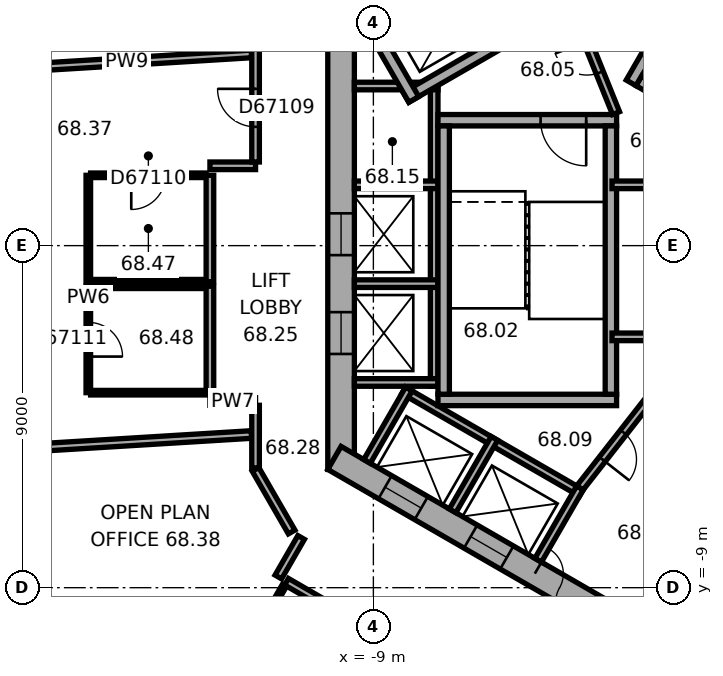
"""IFC4 building model, lengths in metres.
Left out: names, types, materials, properties, quantities, classifications, styles, units other than length and angle.
Written with IfcOpenShell. Run it as: python <this file> out.ifc"""

import sys

from ifc_helpers import new_model, si_unit, direction, frame, frame_2d, origin, place, context, subcontext, project, spatial, rectangle, extrude, element, fill, save


model = new_model("IFC4")
c1 = context("Model", 3, precision=1e-05, world=origin(), true_north=direction((0.0, 1.0)))
c2 = subcontext(c1, "Body", "Model", "MODEL_VIEW")
j1 = project(units=[si_unit("LENGTHUNIT", "METRE"), si_unit("PLANEANGLEUNIT", "RADIAN")], contexts=[c1])
p1 = place(None, origin())
s1 = spatial("IfcSite", under=j1, at=p1, CompositionType="ELEMENT")
p2 = place(p1, origin())
s2 = spatial("IfcBuilding", under=s1, at=p2, CompositionType="ELEMENT")
p3 = place(p2, frame((0.0, 0.0, 274.6)))
s3 = spatial("IfcBuildingStorey", under=s2, at=p3, CompositionType="ELEMENT", Elevation=274.6)
p4 = place(p3, frame((-9.85, 5.889, 0.0), z_axis=(0.0, 0.0, 1.0), x_axis=(0.0, -1.0, 0.0)))
e1 = element("IfcWall", 1, at=p4, inside=s3, PredefinedType="SHEAR", context=c2, shape_type="SweptSolid", body=[
    extrude(rectangle(XDim=11.778, YDim=0.7, at=frame_2d((5.889, 0.0))), origin(), (0.0, 0.0, 1.0), 3.7),
])
p5 = place(p4, frame((5.039, 0.0, 0.0)))
e2 = element("IfcOpeningElement", 2, at=p5, cuts=e1, PredefinedType="OPENING", context=c2, shape_type="SweptSolid", body=[
    extrude(rectangle(XDim=1.1, YDim=2.1, at=frame_2d((0.55, 1.05))), frame((0.0, 0.36, 0.0), z_axis=(0.0, -1.0, 0.0), x_axis=(1.0, 0.0, 0.0)), (0.0, 0.0, 1.0), 0.72),
])
p6 = place(p4, frame((7.639, 0.0, 0.0)))
e3 = element("IfcOpeningElement", 3, at=p6, cuts=e1, PredefinedType="OPENING", context=c2, shape_type="SweptSolid", body=[
    extrude(rectangle(XDim=1.1, YDim=2.1, at=frame_2d((0.55, 1.05))), frame((0.0, 0.36, 0.0), z_axis=(0.0, -1.0, 0.0), x_axis=(1.0, 0.0, 0.0)), (0.0, 0.0, 1.0), 0.72),
])
p7 = place(p3, frame((-10.025, -5.586, 0.0), z_axis=(0.0, 0.0, 1.0), x_axis=(0.866026453023, -0.499998182661, 0.0)))
e4 = element("IfcWall", 4, at=p7, inside=s3, PredefinedType="SHEAR", context=c2, shape_type="SweptSolid", body=[
    extrude(rectangle(XDim=11.778, YDim=0.7, at=frame_2d((5.889, 0.0))), origin(), (0.0, 0.0, 1.0), 3.7),
])
p8 = place(p7, frame((6.089, 0.0, 0.0)))
e5 = element("IfcOpeningElement", 5, at=p8, cuts=e4, PredefinedType="OPENING", context=c2, shape_type="SweptSolid", body=[
    extrude(rectangle(XDim=1.5, YDim=2.1, at=frame_2d((0.75, 1.05))), frame((0.0, 0.36, 0.0), z_axis=(0.0, -1.0, 0.0), x_axis=(1.0, 0.0, 0.0)), (0.0, 0.0, 1.0), 0.72),
])
p9 = place(p7, frame((1.539, 0.0, 0.0)))
e6 = element("IfcOpeningElement", 6, at=p9, cuts=e4, PredefinedType="OPENING", context=c2, shape_type="SweptSolid", body=[
    extrude(rectangle(XDim=1.1, YDim=2.1, at=frame_2d((0.55, 1.05))), frame((0.0, 0.36, 0.0), z_axis=(0.0, -1.0, 0.0), x_axis=(1.0, 0.0, 0.0)), (0.0, 0.0, 1.0), 0.72),
])
p10 = place(p7, frame((4.139, 0.0, 0.0)))
e7 = element("IfcOpeningElement", 7, at=p10, cuts=e4, PredefinedType="OPENING", context=c2, shape_type="SweptSolid", body=[
    extrude(rectangle(XDim=1.1, YDim=2.1, at=frame_2d((0.55, 1.05))), frame((0.0, 0.36, 0.0), z_axis=(0.0, -1.0, 0.0), x_axis=(1.0, 0.0, 0.0)), (0.0, 0.0, 1.0), 0.72),
])
p11 = place(p3, frame((-7.4, 4.3, 0.0), z_axis=(0.0, 0.0, 1.0), x_axis=(0.0, -1.0, 0.0)))
e8 = element("IfcWall", 8, at=p11, inside=s3, PredefinedType="PARTITIONING", context=c2, shape_type="SweptSolid", body=[
    extrude(rectangle(XDim=8.0, YDim=0.2, at=frame_2d((4.0, 0.0))), origin(), (0.0, 0.0, 1.0), 3.35),
])
for number, where, z_axis, x_axis in (
    (9, (-7.3, 4.2, 0.0), (0.0, 0.0, 1.0), (-1.0, 0.0, 0.0)),
    (10, (-7.3, 1.6, 0.0), (0.0, 0.0, 1.0), (-1.0, 0.0, 0.0)),
    (11, (-7.3, -1.0, 0.0), (0.0, 0.0, 1.0), (-1.0, 0.0, 0.0)),
    (12, (-7.3, -3.6, 0.0), (0.0, 0.0, 1.0), (-1.0, 0.0, 0.0)),
):
    element("IfcWall", number, at=place(p3, frame(where, z_axis=z_axis, x_axis=x_axis)), inside=s3, PredefinedType="PARTITIONING", context=c2, shape_type="SweptSolid", body=[
        extrude(rectangle(XDim=2.2, YDim=0.2, at=frame_2d((1.1, 0.0))), origin(), (0.0, 0.0, 1.0), 3.35),
    ])
p12 = place(p3, frame((-8.203, -3.809, 0.0), z_axis=(0.0, 0.0, 1.0), x_axis=(0.866028230842, -0.499995103361, 0.0)))
e13 = element("IfcWall", 13, at=p12, inside=s3, PredefinedType="PARTITIONING", context=c2, shape_type="SweptSolid", body=[
    extrude(rectangle(XDim=5.4, YDim=0.2, at=frame_2d((2.7, 0.0))), origin(), (0.0, 0.0, 1.0), 3.35),
])
for number, where, z_axis, x_axis in (
    (14, (-8.067, -3.772, 0.0), (0.0, 0.0, 1.0), (-0.5, -0.866, 0.0)),
    (15, (-5.815, -5.072, 0.0), (0.0, 0.0, 1.0), (-0.5, -0.866, 0.0)),
):
    element("IfcWall", number, at=place(p3, frame(where, z_axis=z_axis, x_axis=x_axis)), inside=s3, PredefinedType="PARTITIONING", context=c2, shape_type="SweptSolid", body=[
        extrude(rectangle(XDim=2.2, YDim=0.2, at=frame_2d((1.1, 0.0))), origin(), (0.0, 0.0, 1.0), 3.35),
    ])
p13 = place(p3, frame((-3.563, -6.372, 0.0), z_axis=(0.0, 0.0, 1.0), x_axis=(-0.499994660107, -0.866028486751, 0.0)))
e16 = element("IfcWall", 16, at=p13, inside=s3, PredefinedType="PARTITIONING", context=c2, shape_type="SweptSolid", body=[
    extrude(rectangle(XDim=2.2, YDim=0.2, at=frame_2d((1.1, 0.0))), origin(), (0.0, 0.0, 1.0), 3.35),
])
p14 = place(p3, frame((-2.216, 4.282, 0.0), z_axis=(0.0, 0.0, 1.0), x_axis=(0.499977259774, 0.866038532462, 0.0)))
e17 = element("IfcWall", 17, at=p14, inside=s3, PredefinedType="SHEAR", context=c2, shape_type="SweptSolid", body=[
    extrude(rectangle(XDim=4.7, YDim=0.3, at=frame_2d((2.35, 0.0))), origin(), (0.0, 0.0, 1.0), 3.35),
])
p15 = place(p3, frame((4.103, 0.807, 0.0), z_axis=(0.0, 0.0, 1.0), x_axis=(-0.866027801685, 0.499995846692, 0.0)))
e18 = element("IfcWall", 18, at=p15, inside=s3, PredefinedType="SHEAR", context=c2, shape_type="SweptSolid", body=[
    extrude(rectangle(XDim=7.06, YDim=0.3, at=frame_2d((3.53, 0.0))), origin(), (0.0, 0.0, 1.0), 3.35),
])
p16 = place(p3, frame((-2.6, 3.3, 0.0), z_axis=(0.0, 0.0, 1.0), x_axis=(-1.0, 0.0, 0.0)))
e19 = element("IfcWall", 19, at=p16, inside=s3, PredefinedType="SHEAR", context=c2, shape_type="SweptSolid", body=[
    extrude(rectangle(XDim=4.7, YDim=0.3, at=frame_2d((2.35, 0.0))), origin(), (0.0, 0.0, 1.0), 3.35),
])
p17 = place(p16, frame((0.8, 0.0, 0.0)))
e20 = element("IfcOpeningElement", 20, at=p17, cuts=e19, PredefinedType="OPENING", context=c2, shape_type="SweptSolid", body=[
    extrude(rectangle(XDim=1.2, YDim=2.1, at=frame_2d((0.6, 1.05))), frame((0.0, 0.16, 0.0), z_axis=(0.0, -1.0, 0.0), x_axis=(1.0, 0.0, 0.0)), (0.0, 0.0, 1.0), 0.32),
])
p18 = place(p3, frame((-2.6, -4.06, 0.0), z_axis=(0.0, 0.0, 1.0), x_axis=(-1.0, 0.0, 0.0)))
e21 = element("IfcWall", 21, at=p18, inside=s3, PredefinedType="SHEAR", context=c2, shape_type="SweptSolid", body=[
    extrude(rectangle(XDim=4.7, YDim=0.3, at=frame_2d((2.35, 0.0))), origin(), (0.0, 0.0, 1.0), 3.35),
])
for number, where, z_axis, x_axis in (
    (22, (-2.75, 3.15, 0.0), (0.0, 0.0, 1.0), (0.0, -1.0, 0.0)),
    (23, (-7.15, 3.15, 0.0), (0.0, 0.0, 1.0), (0.0, -1.0, 0.0)),
):
    element("IfcWall", number, at=place(p3, frame(where, z_axis=z_axis, x_axis=x_axis)), inside=s3, PredefinedType="SHEAR", context=c2, shape_type="SweptSolid", body=[
        extrude(rectangle(XDim=7.06, YDim=0.3, at=frame_2d((3.53, 0.0))), origin(), (0.0, 0.0, 1.0), 3.35),
    ])
p19 = place(p3, frame((-5.24, 5.577, 0.0), z_axis=(0.0, 0.0, 1.0), x_axis=(-0.866014461049, -0.500018952895, 0.0)))
e24 = element("IfcWall", 24, at=p19, inside=s3, PredefinedType="SHEAR", context=c2, shape_type="SweptSolid", body=[
    extrude(rectangle(XDim=3.35, YDim=0.3, at=frame_2d((1.675, 0.0))), origin(), (0.0, 0.0, 1.0), 3.35),
])
p20 = place(p3, frame((-7.937, 3.847, 0.0), z_axis=(0.0, 0.0, 1.0), x_axis=(-0.50002983664, 0.866008176907, 0.0)))
e25 = element("IfcWall", 25, at=p20, inside=s3, PredefinedType="SHEAR", context=c2, shape_type="SweptSolid", body=[
    extrude(rectangle(XDim=2.2, YDim=0.3, at=frame_2d((1.1, 0.0))), origin(), (0.0, 0.0, 1.0), 3.35),
])
p21 = place(p3, frame((-2.615, 3.487, 0.0), z_axis=(0.0, 0.0, 1.0), x_axis=(-0.373576831041, 0.92759924068, 0.0)))
e26 = element("IfcWall", 26, at=p21, inside=s3, PredefinedType="PARTITIONING", context=c2, shape_type="SweptSolid", body=[
    extrude(rectangle(XDim=3.002, YDim=0.2, at=frame_2d((1.501, 0.0))), origin(), (0.0, 0.0, 1.0), 3.35),
])
p22 = place(p21, frame((1.15, 0.0, 0.0)))
e27 = element("IfcOpeningElement", 27, at=p22, cuts=e26, PredefinedType="OPENING", context=c2, shape_type="SweptSolid", body=[
    extrude(rectangle(XDim=0.9, YDim=2.1, at=frame_2d((0.45, 1.05))), frame((0.0, 0.11, 0.0), z_axis=(0.0, -1.0, 0.0), x_axis=(1.0, 0.0, 0.0)), (0.0, 0.0, 1.0), 0.22),
])
p23 = place(p3, frame((-1.712, -4.008, 0.0), z_axis=(0.0, 0.0, 1.0), x_axis=(-0.616549420702, -0.787316208287, 0.0)))
e28 = element("IfcWall", 28, at=p23, inside=s3, PredefinedType="PARTITIONING", context=c2, shape_type="SweptSolid", body=[
    extrude(rectangle(XDim=3.002, YDim=0.2, at=frame_2d((1.501, 0.0))), origin(), (0.0, 0.0, 1.0), 3.35),
])
p24 = place(p23, frame((1.15, 0.0, 0.0)))
e29 = element("IfcOpeningElement", 29, at=p24, cuts=e28, PredefinedType="OPENING", context=c2, shape_type="SweptSolid", body=[
    extrude(rectangle(XDim=0.9, YDim=2.1, at=frame_2d((0.45, 1.05))), frame((0.0, 0.11, 0.0), z_axis=(0.0, -1.0, 0.0), x_axis=(1.0, 0.0, 0.0)), (0.0, 0.0, 1.0), 0.22),
])
p25 = place(p3, frame((-2.72, -2.4, 0.0), z_axis=(0.0, 0.0, 1.0), x_axis=(1.0, 0.0, 0.0)))
e30 = element("IfcWall", 30, at=p25, inside=s3, PredefinedType="PARTITIONING", context=c2, shape_type="SweptSolid", body=[
    extrude(rectangle(XDim=3.883, YDim=0.2, at=frame_2d((1.941, 0.0))), origin(), (0.0, 0.0, 1.0), 3.35),
])
p26 = place(p3, frame((-2.72, 1.6, 0.0), z_axis=(0.0, 0.0, 1.0), x_axis=(1.0, 0.0, 0.0)))
e31 = element("IfcWall", 31, at=p26, inside=s3, PredefinedType="PARTITIONING", context=c2, shape_type="SweptSolid", body=[
    extrude(rectangle(XDim=5.269, YDim=0.2, at=frame_2d((2.634, 0.0))), origin(), (0.0, 0.0, 1.0), 3.35),
])
p27 = place(p3, frame((-18.768, 4.643, 0.0), z_axis=(0.0, 0.0, 1.0), x_axis=(0.99813496285, 0.0610458511, 0.0)))
e32 = element("IfcWall", 32, at=p27, inside=s3, PredefinedType="PARTITIONING", context=c2, shape_type="SweptSolid", body=[
    extrude(rectangle(XDim=6.571, YDim=0.2, at=frame_2d((3.285, 0.0))), origin(), (0.0, 0.0, 1.0), 3.35),
])
p28 = place(p3, frame((-18.158, -5.333, 0.0), z_axis=(0.0, 0.0, 1.0), x_axis=(0.998135365626, 0.061039265125, 0.0)))
e33 = element("IfcWall", 33, at=p28, inside=s3, PredefinedType="PARTITIONING", context=c2, shape_type="SweptSolid", body=[
    extrude(rectangle(XDim=5.96, YDim=0.2, at=frame_2d((2.98, 0.0))), origin(), (0.0, 0.0, 1.0), 2.65),
])
p29 = place(p3, frame((-16.501, -3.869, 0.0), z_axis=(0.0, 0.0, 1.0), x_axis=(0.0, 1.0, 0.0)))
e34 = element("IfcWall", 34, at=p29, inside=s3, PredefinedType="PARTITIONING", context=c2, shape_type="SweptSolid", body=[
    extrude(rectangle(XDim=2.8, YDim=0.12, at=frame_2d((1.4, 0.0))), origin(), (0.0, 0.0, 1.0), 3.35),
])
p30 = place(p29, frame((0.95, 0.0, 0.0)))
e35 = element("IfcOpeningElement", 35, at=p30, cuts=e34, PredefinedType="OPENING", context=c2, shape_type="SweptSolid", body=[
    extrude(rectangle(XDim=0.9, YDim=2.1, at=frame_2d((0.45, 1.05))), frame((0.0, 0.07, 0.0), z_axis=(0.0, -1.0, 0.0), x_axis=(1.0, 0.0, 0.0)), (0.0, 0.0, 1.0), 0.14),
])
p31 = place(p3, frame((-16.501, -0.949, 0.0), z_axis=(0.0, 0.0, 1.0), x_axis=(0.0, 1.0, 0.0)))
e36 = element("IfcWall", 36, at=p31, inside=s3, PredefinedType="PARTITIONING", context=c2, shape_type="SweptSolid", body=[
    extrude(rectangle(XDim=2.8, YDim=0.12, at=frame_2d((1.4, 0.0))), origin(), (0.0, 0.0, 1.0), 3.35),
])
p32 = place(p3, frame((-16.441, -1.069, 0.0), z_axis=(0.0, 0.0, 1.0), x_axis=(1.0, 0.0, 0.0)))
e37 = element("IfcWall", 37, at=p32, inside=s3, PredefinedType="PARTITIONING", context=c2, shape_type="SweptSolid", body=[
    extrude(rectangle(XDim=3.04, YDim=0.12, at=frame_2d((1.52, 0.0))), origin(), (0.0, 0.0, 1.0), 3.35),
])
p33 = place(p3, frame((-16.441, 1.851, 0.0), z_axis=(0.0, 0.0, 1.0), x_axis=(1.0, 0.0, 0.0)))
e38 = element("IfcWall", 38, at=p33, inside=s3, PredefinedType="PARTITIONING", context=c2, shape_type="SweptSolid", body=[
    extrude(rectangle(XDim=3.04, YDim=0.12, at=frame_2d((1.52, 0.0))), origin(), (0.0, 0.0, 1.0), 3.35),
])
p34 = place(p33, frame((1.07, 0.0, 0.0)))
e39 = element("IfcOpeningElement", 39, at=p34, cuts=e38, PredefinedType="OPENING", context=c2, shape_type="SweptSolid", body=[
    extrude(rectangle(XDim=0.9, YDim=2.1, at=frame_2d((0.45, 1.05))), frame((0.0, 0.07, 0.0), z_axis=(0.0, -1.0, 0.0), x_axis=(1.0, 0.0, 0.0)), (0.0, 0.0, 1.0), 0.14),
])
for number, where, z_axis, x_axis in (
    (40, (-13.401, -3.869, 0.0), (0.0, 0.0, 1.0), (-1.0, 0.0, 0.0)),
    (41, (-13.401, -0.949, 0.0), (0.0, 0.0, 1.0), (-1.0, 0.0, 0.0)),
):
    element("IfcWall", number, at=place(p3, frame(where, z_axis=z_axis, x_axis=x_axis)), inside=s3, PredefinedType="PARTITIONING", context=c2, shape_type="SweptSolid", body=[
        extrude(rectangle(XDim=3.04, YDim=0.12, at=frame_2d((1.52, 0.0))), origin(), (0.0, 0.0, 1.0), 3.35),
    ])
p35 = place(p3, frame((-13.301, -4.101, 0.0), z_axis=(0.0, 0.0, 1.0), x_axis=(1.0, 0.0, 0.0)))
e42 = element("IfcWall", 42, at=p35, inside=s3, PredefinedType="PARTITIONING", context=c2, shape_type="SweptSolid", body=[
    extrude(rectangle(XDim=1.201, YDim=0.2, at=frame_2d((0.601, 0.0))), origin(), (0.0, 0.0, 1.0), 3.35),
])
p36 = place(p3, frame((-13.301, -1.069, 0.0), z_axis=(0.0, 0.0, 1.0), x_axis=(0.0, -1.0, 0.0)))
e43 = element("IfcWall", 43, at=p36, inside=s3, PredefinedType="PARTITIONING", context=c2, shape_type="SweptSolid", body=[
    extrude(rectangle(XDim=2.8, YDim=0.2, at=frame_2d((1.4, 0.0))), origin(), (0.0, 0.0, 1.0), 3.35),
])
p37 = place(p3, frame((-13.301, 1.851, 0.0), z_axis=(0.0, 0.0, 1.0), x_axis=(0.0, -1.0, 0.0)))
e44 = element("IfcWall", 44, at=p37, inside=s3, PredefinedType="PARTITIONING", context=c2, shape_type="SweptSolid", body=[
    extrude(rectangle(XDim=2.8, YDim=0.2, at=frame_2d((1.4, 0.0))), origin(), (0.0, 0.0, 1.0), 3.35),
])
p38 = place(p3, frame((-12.585, -11.095, 0.0), z_axis=(0.0, 0.0, 1.0), x_axis=(0.500004234368, 0.866022959057, 0.0)))
e45 = element("IfcWall", 45, at=p38, inside=s3, PredefinedType="PARTITIONING", context=c2, shape_type="SweptSolid", body=[
    extrude(rectangle(XDim=2.5, YDim=0.12, at=frame_2d((1.25, 0.0))), origin(), (0.0, 0.0, 1.0), 3.35),
])
p39 = place(p3, frame((-12.1, -5.889, 0.0), z_axis=(0.0, 0.0, 1.0), x_axis=(0.500063520245, -0.865988727248, 0.0)))
e46 = element("IfcWall", 46, at=p39, inside=s3, PredefinedType="PARTITIONING", context=c2, shape_type="SweptSolid", body=[
    extrude(rectangle(XDim=1.9, YDim=0.2, at=frame_2d((0.95, 0.0))), origin(), (0.0, 0.0, 1.0), 3.35),
])
p40 = place(p3, frame((-12.1, -4.201, 0.0), z_axis=(0.0, 0.0, 1.0), x_axis=(0.0, -1.0, 0.0)))
e47 = element("IfcWall", 47, at=p40, inside=s3, PredefinedType="PARTITIONING", context=c2, shape_type="SweptSolid", body=[
    extrude(rectangle(XDim=1.648, YDim=0.2, at=frame_2d((0.824, 0.0))), origin(), (0.0, 0.0, 1.0), 3.35),
])
p41 = place(p3, frame((-12.1, 2.101, 0.0), z_axis=(0.0, 0.0, 1.0), x_axis=(-1.0, 0.0, 0.0)))
e48 = element("IfcWall", 48, at=p41, inside=s3, PredefinedType="PARTITIONING", context=c2, shape_type="SweptSolid", body=[
    extrude(rectangle(XDim=1.201, YDim=0.2, at=frame_2d((0.601, 0.0))), origin(), (0.0, 0.0, 1.0), 3.35),
])
p42 = place(p3, frame((-12.1, 5.889, 0.0), z_axis=(0.0, 0.0, 1.0), x_axis=(0.0, -1.0, 0.0)))
e49 = element("IfcWall", 49, at=p42, inside=s3, PredefinedType="PARTITIONING", context=c2, shape_type="SweptSolid", body=[
    extrude(rectangle(XDim=3.688, YDim=0.2, at=frame_2d((1.844, 0.0))), origin(), (0.0, 0.0, 1.0), 3.35),
])
p43 = place(p42, frame((1.763, 0.0, 0.0)))
e50 = element("IfcOpeningElement", 50, at=p43, cuts=e49, PredefinedType="OPENING", context=c2, shape_type="SweptSolid", body=[
    extrude(rectangle(XDim=1.0, YDim=2.1, at=frame_2d((0.5, 1.05))), frame((0.0, 0.11, 0.0), z_axis=(0.0, -1.0, 0.0), x_axis=(1.0, 0.0, 0.0)), (0.0, 0.0, 1.0), 0.22),
])
p44 = place(p3, frame((-11.285, -8.844, 0.0), z_axis=(0.0, 0.0, 1.0), x_axis=(0.866021785011, -0.500006267848, 0.0)))
e51 = element("IfcWall", 51, at=p44, inside=s3, PredefinedType="PARTITIONING", context=c2, shape_type="SweptSolid", body=[
    extrude(rectangle(XDim=4.468, YDim=0.2, at=frame_2d((2.234, 0.0))), origin(), (0.0, 0.0, 1.0), 3.35),
])
p45 = place(p3, frame((-10.901, -7.678, 0.0), z_axis=(0.0, 0.0, 1.0), x_axis=(-0.500074377092, -0.865982457891, 0.0)))
e52 = element("IfcWall", 52, at=p45, inside=s3, PredefinedType="PARTITIONING", context=c2, shape_type="SweptSolid", body=[
    extrude(rectangle(XDim=1.201, YDim=0.2, at=frame_2d((0.601, 0.0))), origin(), (0.0, 0.0, 1.0), 3.35),
])
p46 = place(p8, origin())
e53 = element("IfcDoor", 53, at=p46, inside=s3, OperationType="DOUBLE_DOOR_SINGLE_SWING", PredefinedType="DOOR", context=c2, shape_type="SweptSolid", body=[
    extrude(rectangle(XDim=1.5, YDim=2.1, at=frame_2d((0.75, 1.05))), frame((0.0, 0.025, 0.0), z_axis=(0.0, -1.0, 0.0), x_axis=(1.0, 0.0, 0.0)), (0.0, 0.0, 1.0), 0.05),
])
fill(e5, e53)
p47 = place(p17, origin())
e54 = element("IfcDoor", 54, at=p47, inside=s3, OperationType="SINGLE_SWING_RIGHT", PredefinedType="DOOR", context=c2, shape_type="SweptSolid", body=[
    extrude(rectangle(XDim=1.2, YDim=2.1, at=frame_2d((0.6, 1.05))), frame((0.0, 0.025, 0.0), z_axis=(0.0, -1.0, 0.0), x_axis=(1.0, 0.0, 0.0)), (0.0, 0.0, 1.0), 0.05),
])
fill(e20, e54)
p48 = place(p22, origin())
e55 = element("IfcDoor", 55, at=p48, inside=s3, OperationType="SINGLE_SWING_LEFT", PredefinedType="DOOR", context=c2, shape_type="SweptSolid", body=[
    extrude(rectangle(XDim=0.9, YDim=2.1, at=frame_2d((0.45, 1.05))), frame((0.0, 0.025, 0.0), z_axis=(0.0, -1.0, 0.0), x_axis=(1.0, 0.0, 0.0)), (0.0, 0.0, 1.0), 0.05),
])
fill(e27, e55)
p49 = place(p24, origin())
e56 = element("IfcDoor", 56, at=p49, inside=s3, OperationType="SINGLE_SWING_LEFT", PredefinedType="DOOR", context=c2, shape_type="SweptSolid", body=[
    extrude(rectangle(XDim=0.9, YDim=2.1, at=frame_2d((0.45, 1.05))), frame((0.0, 0.025, 0.0), z_axis=(0.0, -1.0, 0.0), x_axis=(1.0, 0.0, 0.0)), (0.0, 0.0, 1.0), 0.05),
])
fill(e29, e56)
p50 = place(p5, origin())
e57 = element("IfcDoor", 57, at=p50, inside=s3, OperationType="DOUBLE_DOOR_SLIDING", PredefinedType="DOOR", context=c2, shape_type="SweptSolid", body=[
    extrude(rectangle(XDim=1.1, YDim=2.1, at=frame_2d((0.55, 1.05))), frame((0.0, 0.025, 0.0), z_axis=(0.0, -1.0, 0.0), x_axis=(1.0, 0.0, 0.0)), (0.0, 0.0, 1.0), 0.05),
])
fill(e2, e57)
p51 = place(p6, origin())
e58 = element("IfcDoor", 58, at=p51, inside=s3, OperationType="DOUBLE_DOOR_SLIDING", PredefinedType="DOOR", context=c2, shape_type="SweptSolid", body=[
    extrude(rectangle(XDim=1.1, YDim=2.1, at=frame_2d((0.55, 1.05))), frame((0.0, 0.025, 0.0), z_axis=(0.0, -1.0, 0.0), x_axis=(1.0, 0.0, 0.0)), (0.0, 0.0, 1.0), 0.05),
])
fill(e3, e58)
p52 = place(p9, origin())
e59 = element("IfcDoor", 59, at=p52, inside=s3, OperationType="DOUBLE_DOOR_SLIDING", PredefinedType="DOOR", context=c2, shape_type="SweptSolid", body=[
    extrude(rectangle(XDim=1.1, YDim=2.1, at=frame_2d((0.55, 1.05))), frame((0.0, 0.025, 0.0), z_axis=(0.0, -1.0, 0.0), x_axis=(1.0, 0.0, 0.0)), (0.0, 0.0, 1.0), 0.05),
])
fill(e6, e59)
p53 = place(p10, origin())
e60 = element("IfcDoor", 60, at=p53, inside=s3, OperationType="DOUBLE_DOOR_SLIDING", PredefinedType="DOOR", context=c2, shape_type="SweptSolid", body=[
    extrude(rectangle(XDim=1.1, YDim=2.1, at=frame_2d((0.55, 1.05))), frame((0.0, 0.025, 0.0), z_axis=(0.0, -1.0, 0.0), x_axis=(1.0, 0.0, 0.0)), (0.0, 0.0, 1.0), 0.05),
])
fill(e7, e60)
p54 = place(p43, origin())
e61 = element("IfcDoor", 61, at=p54, inside=s3, OperationType="SINGLE_SWING_LEFT", PredefinedType="DOOR", context=c2, shape_type="SweptSolid", body=[
    extrude(rectangle(XDim=1.0, YDim=2.1, at=frame_2d((0.5, 1.05))), frame((0.0, 0.025, 0.0), z_axis=(0.0, -1.0, 0.0), x_axis=(1.0, 0.0, 0.0)), (0.0, 0.0, 1.0), 0.05),
])
fill(e50, e61)
p55 = place(p34, origin())
e62 = element("IfcDoor", 62, at=p55, inside=s3, OperationType="SINGLE_SWING_LEFT", PredefinedType="DOOR", context=c2, shape_type="SweptSolid", body=[
    extrude(rectangle(XDim=0.9, YDim=2.1, at=frame_2d((0.45, 1.05))), frame((0.0, 0.025, 0.0), z_axis=(0.0, -1.0, 0.0), x_axis=(1.0, 0.0, 0.0)), (0.0, 0.0, 1.0), 0.05),
])
fill(e39, e62)
p56 = place(p30, origin())
e63 = element("IfcDoor", 63, at=p56, inside=s3, OperationType="SINGLE_SWING_LEFT", PredefinedType="DOOR", context=c2, shape_type="SweptSolid", body=[
    extrude(rectangle(XDim=0.9, YDim=2.1, at=frame_2d((0.45, 1.05))), frame((0.0, 0.025, 0.0), z_axis=(0.0, -1.0, 0.0), x_axis=(1.0, 0.0, 0.0)), (0.0, 0.0, 1.0), 0.05),
])
fill(e35, e63)
save(model, sys.argv[1])
